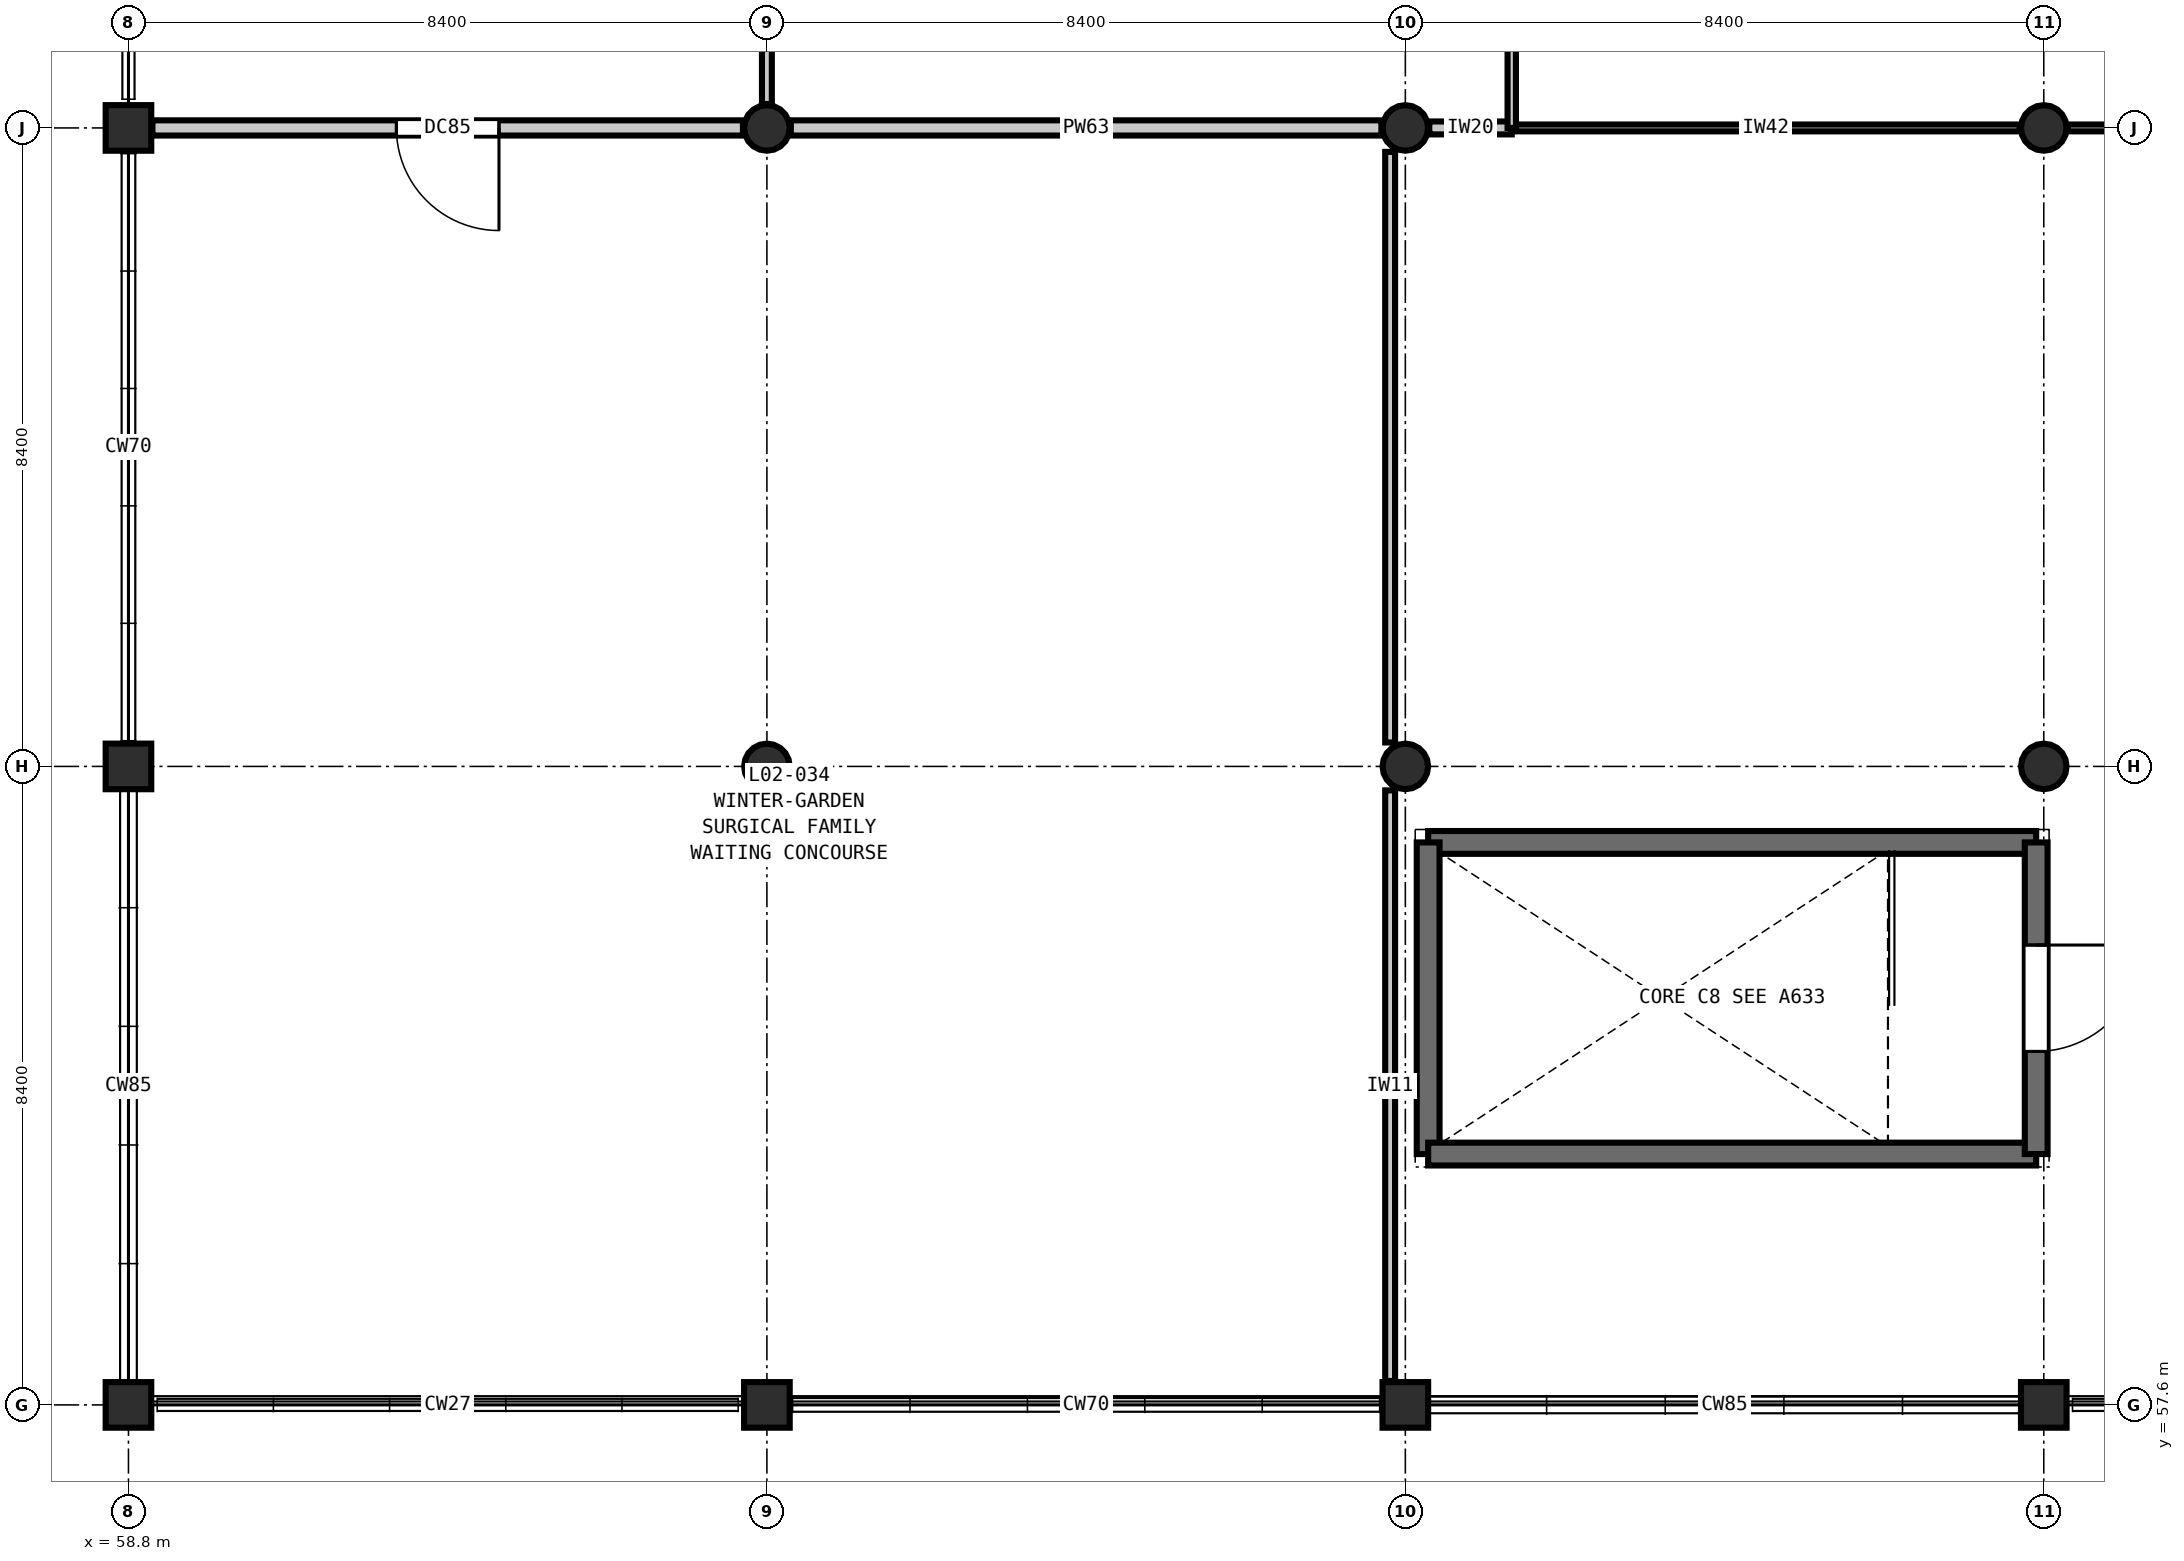
"""IFC4 building model, lengths in metres.
Left out: names, types, materials, properties, quantities, classifications, styles, units other than length and angle.
Written with IfcOpenShell. Run it as: python <this file> out.ifc"""

import sys

from ifc_helpers import new_model, si_unit, direction, frame, frame_2d, origin, origin_2d, place, context, subcontext, project, spatial, rectangle, circle, extrude, element, fill, save


model = new_model("IFC4")
c1 = context("Model", 3, precision=1e-05, world=origin(), true_north=direction((0.0, 1.0)))
c2 = subcontext(c1, "Body", "Model", "MODEL_VIEW")
j1 = project(units=[si_unit("LENGTHUNIT", "METRE"), si_unit("PLANEANGLEUNIT", "RADIAN")], contexts=[c1])
p1 = place(None, origin())
s1 = spatial("IfcSite", under=j1, at=p1, CompositionType="ELEMENT")
p2 = place(p1, origin())
s2 = spatial("IfcBuilding", under=s1, at=p2, CompositionType="ELEMENT")
p3 = place(p2, frame((0.0, 0.0, 10.8)))
s3 = spatial("IfcBuildingStorey", under=s2, at=p3, CompositionType="ELEMENT", Elevation=10.8)
for number, where, z_axis, x_axis in (
    (1, (58.8, 57.6, 0.0), (0.0, 0.0, 1.0), (1.0, 0.0, 0.0)),
    (2, (58.8, 66.0, 0.0), (0.0, 0.0, 1.0), (1.0, 0.0, 0.0)),
    (3, (58.8, 74.4, 0.0), (0.0, 0.0, 1.0), (1.0, 0.0, 0.0)),
    (4, (67.2, 57.6, 0.0), (0.0, 0.0, 1.0), (1.0, 0.0, 0.0)),
):
    element("IfcColumn", number, at=place(p3, frame(where, z_axis=z_axis, x_axis=x_axis)), inside=s3, PredefinedType="COLUMN", context=c2, shape_type="SweptSolid", body=[
        extrude(rectangle(XDim=0.6, YDim=0.6, at=origin_2d()), origin(), (0.0, 0.0, 1.0), 5.4),
    ])
for number, where, z_axis, x_axis in (
    (5, (67.2, 66.0, 0.0), (0.0, 0.0, 1.0), (1.0, 0.0, 0.0)),
    (6, (67.2, 74.4, 0.0), (0.0, 0.0, 1.0), (1.0, 0.0, 0.0)),
):
    element("IfcColumn", number, at=place(p3, frame(where, z_axis=z_axis, x_axis=x_axis)), inside=s3, PredefinedType="COLUMN", context=c2, shape_type="SweptSolid", body=[
        extrude(circle(Radius=0.3, at=origin_2d()), origin(), (0.0, 0.0, 1.0), 5.4),
    ])
p4 = place(p3, frame((75.6, 57.6, 0.0), z_axis=(0.0, 0.0, 1.0), x_axis=(1.0, 0.0, 0.0)))
e7 = element("IfcColumn", 7, at=p4, inside=s3, PredefinedType="COLUMN", context=c2, shape_type="SweptSolid", body=[
    extrude(rectangle(XDim=0.6, YDim=0.6, at=origin_2d()), origin(), (0.0, 0.0, 1.0), 5.4),
])
for number, where, z_axis, x_axis in (
    (8, (75.6, 66.0, 0.0), (0.0, 0.0, 1.0), (1.0, 0.0, 0.0)),
    (9, (75.6, 74.4, 0.0), (0.0, 0.0, 1.0), (1.0, 0.0, 0.0)),
):
    element("IfcColumn", number, at=place(p3, frame(where, z_axis=z_axis, x_axis=x_axis)), inside=s3, PredefinedType="COLUMN", context=c2, shape_type="SweptSolid", body=[
        extrude(circle(Radius=0.3, at=origin_2d()), origin(), (0.0, 0.0, 1.0), 5.4),
    ])
p5 = place(p3, frame((84.0, 57.6, 0.0), z_axis=(0.0, 0.0, 1.0), x_axis=(1.0, 0.0, 0.0)))
e10 = element("IfcColumn", 10, at=p5, inside=s3, PredefinedType="COLUMN", context=c2, shape_type="SweptSolid", body=[
    extrude(rectangle(XDim=0.6, YDim=0.6, at=origin_2d()), origin(), (0.0, 0.0, 1.0), 5.4),
])
for number, where, z_axis, x_axis in (
    (11, (84.0, 66.0, 0.0), (0.0, 0.0, 1.0), (1.0, 0.0, 0.0)),
    (12, (84.0, 74.4, 0.0), (0.0, 0.0, 1.0), (1.0, 0.0, 0.0)),
):
    element("IfcColumn", number, at=place(p3, frame(where, z_axis=z_axis, x_axis=x_axis)), inside=s3, PredefinedType="COLUMN", context=c2, shape_type="SweptSolid", body=[
        extrude(circle(Radius=0.3, at=origin_2d()), origin(), (0.0, 0.0, 1.0), 5.4),
    ])
p6 = place(p3, frame((83.9, 65.0, 0.0), z_axis=(0.0, 0.0, 1.0), x_axis=(-1.0, 0.0, 0.0)))
e13 = element("IfcWall", 13, at=p6, inside=s3, PredefinedType="SHEAR", context=c2, shape_type="SweptSolid", body=[
    extrude(rectangle(XDim=8.0, YDim=0.3, at=frame_2d((4.0, 0.0))), origin(), (0.0, 0.0, 1.0), 5.4),
])
p7 = place(p3, frame((75.9, 65.0, 0.0), z_axis=(0.0, 0.0, 1.0), x_axis=(0.0, -1.0, 0.0)))
e14 = element("IfcWall", 14, at=p7, inside=s3, PredefinedType="SHEAR", context=c2, shape_type="SweptSolid", body=[
    extrude(rectangle(XDim=4.1, YDim=0.3, at=frame_2d((2.05, 0.0))), origin(), (0.0, 0.0, 1.0), 5.4),
])
p8 = place(p3, frame((75.9, 60.9, 0.0), z_axis=(0.0, 0.0, 1.0), x_axis=(1.0, 0.0, 0.0)))
e15 = element("IfcWall", 15, at=p8, inside=s3, PredefinedType="SHEAR", context=c2, shape_type="SweptSolid", body=[
    extrude(rectangle(XDim=8.0, YDim=0.3, at=frame_2d((4.0, 0.0))), origin(), (0.0, 0.0, 1.0), 5.4),
])
p9 = place(p3, frame((83.9, 60.9, 0.0), z_axis=(0.0, 0.0, 1.0), x_axis=(0.0, 1.0, 0.0)))
e16 = element("IfcWall", 16, at=p9, inside=s3, PredefinedType="SHEAR", context=c2, shape_type="SweptSolid", body=[
    extrude(rectangle(XDim=4.1, YDim=0.3, at=frame_2d((2.05, 0.0))), origin(), (0.0, 0.0, 1.0), 5.4),
])
p10 = place(p9, frame((1.35, 0.0, 0.0)))
e17 = element("IfcOpeningElement", 17, at=p10, cuts=e16, PredefinedType="OPENING", context=c2, shape_type="SweptSolid", body=[
    extrude(rectangle(XDim=1.4, YDim=2.2, at=frame_2d((0.7, 1.1))), frame((0.0, 0.16, 0.0), z_axis=(0.0, -1.0, 0.0), x_axis=(1.0, 0.0, 0.0)), (0.0, 0.0, 1.0), 0.32),
])
p11 = place(p3, frame((59.115, 74.4, 0.0), z_axis=(0.0, 0.0, 1.0), x_axis=(1.0, 0.0, 0.0)))
e18 = element("IfcWall", 18, at=p11, inside=s3, PredefinedType="PARTITIONING", context=c2, shape_type="SweptSolid", body=[
    extrude(rectangle(XDim=7.77, YDim=0.2, at=frame_2d((3.885, 0.0))), origin(), (0.0, 0.0, 1.0), 4.735),
])
p12 = place(p11, frame((3.21, 0.0, 0.0)))
e19 = element("IfcOpeningElement", 19, at=p12, cuts=e18, PredefinedType="OPENING", context=c2, shape_type="SweptSolid", body=[
    extrude(rectangle(XDim=1.35, YDim=2.2, at=frame_2d((0.675, 1.1))), frame((0.0, 0.11, 0.0), z_axis=(0.0, -1.0, 0.0), x_axis=(1.0, 0.0, 0.0)), (0.0, 0.0, 1.0), 0.22),
])
p13 = place(p3, frame((67.515, 74.4, 0.0), z_axis=(0.0, 0.0, 1.0), x_axis=(1.0, 0.0, 0.0)))
e20 = element("IfcWall", 20, at=p13, inside=s3, PredefinedType="PARTITIONING", context=c2, shape_type="SweptSolid", body=[
    extrude(rectangle(XDim=7.77, YDim=0.2, at=frame_2d((3.885, 0.0))), origin(), (0.0, 0.0, 1.0), 4.735),
])
p14 = place(p3, frame((75.915, 74.4, 0.0), z_axis=(0.0, 0.0, 1.0), x_axis=(1.0, 0.0, 0.0)))
e21 = element("IfcWall", 21, at=p14, inside=s3, PredefinedType="PARTITIONING", context=c2, shape_type="SweptSolid", body=[
    extrude(rectangle(XDim=1.085, YDim=0.17, at=frame_2d((0.542, 0.0))), origin(), (0.0, 0.0, 1.0), 4.735),
])
p15 = place(p3, frame((77.0, 74.4, 0.0), z_axis=(0.0, 0.0, 1.0), x_axis=(1.0, 0.0, 0.0)))
e22 = element("IfcWall", 22, at=p15, inside=s3, PredefinedType="PARTITIONING", context=c2, shape_type="SweptSolid", body=[
    extrude(rectangle(XDim=6.685, YDim=0.09, at=frame_2d((3.343, 0.0))), origin(), (0.0, 0.0, 1.0), 4.735),
])
p16 = place(p3, frame((84.315, 74.4, 0.0), z_axis=(0.0, 0.0, 1.0), x_axis=(1.0, 0.0, 0.0)))
e23 = element("IfcWall", 23, at=p16, inside=s3, PredefinedType="PARTITIONING", context=c2, shape_type="SweptSolid", body=[
    extrude(rectangle(XDim=1.085, YDim=0.09, at=frame_2d((0.542, 0.0))), origin(), (0.0, 0.0, 1.0), 4.735),
])
for number, where, z_axis, x_axis in (
    (24, (67.2, 74.715, 0.0), (0.0, 0.0, 1.0), (0.0, 1.0, 0.0)),
    (25, (75.4, 57.915, 0.0), (0.0, 0.0, 1.0), (0.0, 1.0, 0.0)),
    (26, (75.4, 66.315, 0.0), (0.0, 0.0, 1.0), (0.0, 1.0, 0.0)),
):
    element("IfcWall", number, at=place(p3, frame(where, z_axis=z_axis, x_axis=x_axis)), inside=s3, PredefinedType="PARTITIONING", context=c2, shape_type="SweptSolid", body=[
        extrude(rectangle(XDim=7.77, YDim=0.13, at=frame_2d((3.885, 0.0))), origin(), (0.0, 0.0, 1.0), 4.735),
    ])
p17 = place(p3, frame((77.0, 74.4, 0.0), z_axis=(0.0, 0.0, 1.0), x_axis=(0.0, 1.0, 0.0)))
e27 = element("IfcWall", 27, at=p17, inside=s3, PredefinedType="PARTITIONING", context=c2, shape_type="SweptSolid", body=[
    extrude(rectangle(XDim=11.4, YDim=0.11, at=frame_2d((5.7, 0.0))), origin(), (0.0, 0.0, 1.0), 5.07),
])
p18 = place(p10, frame((1.4, 0.0, 0.0), z_axis=(0.0, 0.0, 1.0), x_axis=(-1.0, 0.0, 0.0)))
e28 = element("IfcDoor", 28, at=p18, inside=s3, OperationType="SINGLE_SWING_LEFT", PredefinedType="DOOR", context=c2, shape_type="SweptSolid", body=[
    extrude(rectangle(XDim=1.4, YDim=2.2, at=frame_2d((0.7, 1.1))), frame((0.0, 0.025, 0.0), z_axis=(0.0, -1.0, 0.0), x_axis=(1.0, 0.0, 0.0)), (0.0, 0.0, 1.0), 0.05),
])
fill(e17, e28)
p19 = place(p12, frame((1.35, 0.0, 0.0), z_axis=(0.0, 0.0, 1.0), x_axis=(-1.0, 0.0, 0.0)))
e29 = element("IfcDoor", 29, at=p19, inside=s3, OperationType="SINGLE_SWING_LEFT", PredefinedType="DOOR", context=c2, shape_type="SweptSolid", body=[
    extrude(rectangle(XDim=1.35, YDim=2.2, at=frame_2d((0.675, 1.1))), frame((0.0, 0.025, 0.0), z_axis=(0.0, -1.0, 0.0), x_axis=(1.0, 0.0, 0.0)), (0.0, 0.0, 1.0), 0.05),
])
fill(e19, e29)
save(model, sys.argv[1])
